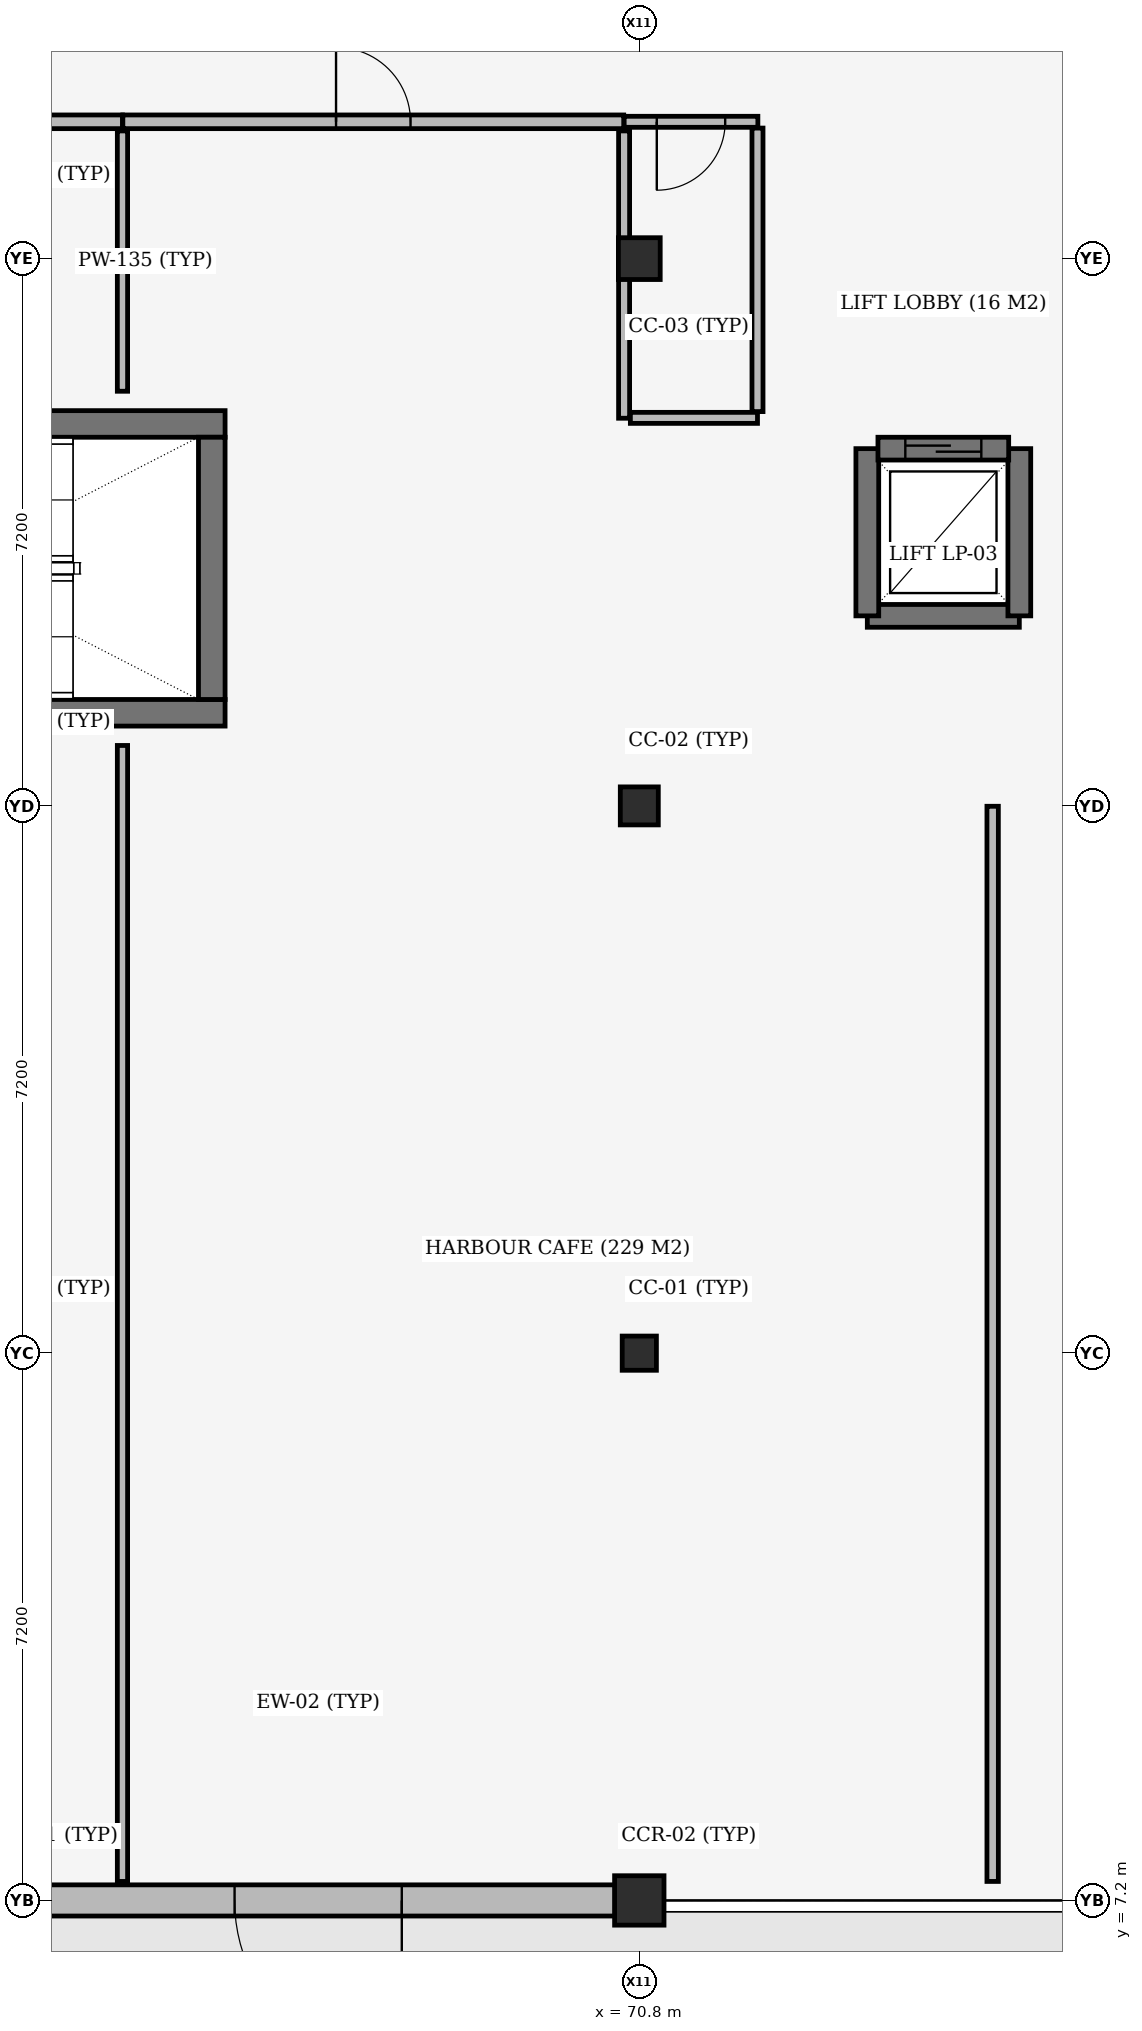
"""IFC4 building model, lengths in metres.
Left out: names, types, materials, properties, quantities, classifications, styles, units other than length and angle.
Written with IfcOpenShell. Run it as: python <this file> out.ifc"""

import sys

from ifc_helpers import new_model, si_unit, direction, frame, frame_2d, origin, origin_2d, place, context, subcontext, project, spatial, rectangle, circle, extrude, element, fill, save


model = new_model("IFC4")
c1 = context("Model", 3, precision=1e-05, world=origin(), true_north=direction((0.0, 1.0)))
c2 = subcontext(c1, "Body", "Model", "MODEL_VIEW")
j1 = project(units=[si_unit("LENGTHUNIT", "METRE"), si_unit("PLANEANGLEUNIT", "RADIAN")], contexts=[c1])
p1 = place(None, origin())
s1 = spatial("IfcSite", under=j1, at=p1, CompositionType="ELEMENT")
p2 = place(p1, origin())
s2 = spatial("IfcBuilding", under=s1, at=p2, CompositionType="ELEMENT")
p3 = place(p2, origin())
s3 = spatial("IfcBuildingStorey", under=s2, at=p3, CompositionType="ELEMENT", Elevation=0.0)
p4 = place(p3, frame((70.8, 7.2, 0.0), z_axis=(0.0, 0.0, 1.0), x_axis=(1.0, 0.0, 0.0)))
e1 = element("IfcColumn", 1, at=p4, inside=s3, PredefinedType="COLUMN", context=c2, shape_type="SweptSolid", body=[
    extrude(circle(Radius=0.325, at=origin_2d()), origin(), (0.0, 0.0, 1.0), 5.1),
])
p5 = place(p3, frame((70.8, 14.4, 0.0), z_axis=(0.0, 0.0, 1.0), x_axis=(1.0, 0.0, 0.0)))
e2 = element("IfcColumn", 2, at=p5, inside=s3, PredefinedType="COLUMN", context=c2, shape_type="SweptSolid", body=[
    extrude(rectangle(XDim=0.45, YDim=0.45, at=origin_2d()), origin(), (0.0, 0.0, 1.0), 5.1),
])
p6 = place(p3, frame((70.8, 21.6, 0.0), z_axis=(0.0, 0.0, 1.0), x_axis=(1.0, 0.0, 0.0)))
e3 = element("IfcColumn", 3, at=p6, inside=s3, PredefinedType="COLUMN", context=c2, shape_type="SweptSolid", body=[
    extrude(rectangle(XDim=0.5, YDim=0.5, at=origin_2d()), origin(), (0.0, 0.0, 1.0), 5.1),
])
p7 = place(p3, frame((70.8, 28.8, 0.0), z_axis=(0.0, 0.0, 1.0), x_axis=(1.0, 0.0, 0.0)))
e4 = element("IfcColumn", 4, at=p7, inside=s3, PredefinedType="COLUMN", context=c2, shape_type="SweptSolid", body=[
    extrude(rectangle(XDim=0.55, YDim=0.55, at=origin_2d()), origin(), (0.0, 0.0, 1.0), 5.1),
])
for number, where, z_axis, x_axis in (
    (5, (56.25, 22.825, 0.0), (0.0, 0.0, 1.0), (1.0, 0.0, 0.0)),
    (6, (65.35, 26.625, 0.0), (0.0, 0.0, 1.0), (-1.0, 0.0, 0.0)),
):
    element("IfcWall", number, at=place(p3, frame(where, z_axis=z_axis, x_axis=x_axis)), inside=s3, PredefinedType="SHEAR", context=c2, shape_type="SweptSolid", body=[
        extrude(rectangle(XDim=9.1, YDim=0.35, at=frame_2d((4.55, 0.0))), origin(), (0.0, 0.0, 1.0), 5.1),
    ])
p8 = place(p3, frame((65.175, 23.0, 0.0), z_axis=(0.0, 0.0, 1.0), x_axis=(0.0, 1.0, 0.0)))
e7 = element("IfcWall", 7, at=p8, inside=s3, PredefinedType="SHEAR", context=c2, shape_type="SweptSolid", body=[
    extrude(rectangle(XDim=3.45, YDim=0.35, at=frame_2d((1.725, 0.0))), origin(), (0.0, 0.0, 1.0), 5.1),
])
p9 = place(p3, frame((73.8, 24.1, 0.0), z_axis=(0.0, 0.0, 1.0), x_axis=(1.0, 0.0, 0.0)))
e8 = element("IfcWall", 8, at=p9, inside=s3, PredefinedType="SHEAR", context=c2, shape_type="SweptSolid", body=[
    extrude(rectangle(XDim=2.0, YDim=0.3, at=frame_2d((1.0, 0.0))), origin(), (0.0, 0.0, 1.0), 5.1),
])
for number, where, z_axis, x_axis in (
    (9, (73.8, 26.3, 0.0), (0.0, 0.0, 1.0), (0.0, -1.0, 0.0)),
    (10, (75.8, 24.1, 0.0), (0.0, 0.0, 1.0), (0.0, 1.0, 0.0)),
):
    element("IfcWall", number, at=place(p3, frame(where, z_axis=z_axis, x_axis=x_axis)), inside=s3, PredefinedType="SHEAR", context=c2, shape_type="SweptSolid", body=[
        extrude(rectangle(XDim=2.2, YDim=0.3, at=frame_2d((1.1, 0.0))), origin(), (0.0, 0.0, 1.0), 5.1),
    ])
p10 = place(p3, frame((70.483, 7.2, 0.0), z_axis=(0.0, 0.0, 1.0), x_axis=(-1.0, 0.0, 0.0)))
e11 = element("IfcWall", 11, at=p10, inside=s3, PredefinedType="STANDARD", context=c2, shape_type="SweptSolid", body=[
    extrude(rectangle(XDim=7.816, YDim=0.41, at=frame_2d((3.908, 0.0))), origin(), (0.0, 0.0, 1.0), 4.4),
])
p11 = place(p10, frame((2.808, 0.0, 0.0)))
e12 = element("IfcOpeningElement", 12, at=p11, cuts=e11, PredefinedType="OPENING", context=c2, shape_type="SweptSolid", body=[
    extrude(rectangle(XDim=2.2, YDim=2.5, at=frame_2d((1.1, 1.25))), frame((0.0, 0.215, 0.0), z_axis=(0.0, -1.0, 0.0), x_axis=(1.0, 0.0, 0.0)), (0.0, 0.0, 1.0), 0.43),
])
p12 = place(p3, frame((73.94, 26.3, 0.0), z_axis=(0.0, 0.0, 1.0), x_axis=(1.0, 0.0, 0.0)))
e13 = element("IfcWall", 13, at=p12, inside=s3, PredefinedType="SHEAR", context=c2, shape_type="SweptSolid", body=[
    extrude(rectangle(XDim=1.72, YDim=0.3, at=frame_2d((0.86, 0.0))), origin(), (0.0, 0.0, 1.0), 5.1),
])
p13 = place(p12, frame((0.36, 0.0, 0.0)))
e14 = element("IfcOpeningElement", 14, at=p13, cuts=e13, PredefinedType="OPENING", context=c2, shape_type="SweptSolid", body=[
    extrude(rectangle(XDim=1.0, YDim=2.1, at=frame_2d((0.5, 1.05))), frame((0.0, 0.16, 0.0), z_axis=(0.0, -1.0, 0.0), x_axis=(1.0, 0.0, 0.0)), (0.0, 0.0, 1.0), 0.32),
])
p14 = place(p3, frame((70.6, 30.6, 0.0), z_axis=(0.0, 0.0, 1.0), x_axis=(1.0, 0.0, 0.0)))
e15 = element("IfcWall", 15, at=p14, inside=s3, PredefinedType="PLUMBINGWALL", context=c2, shape_type="SweptSolid", body=[
    extrude(rectangle(XDim=1.76, YDim=0.145, at=frame_2d((0.88, 0.0))), origin(), (0.0, 0.0, 1.0), 4.5),
])
p15 = place(p14, frame((0.43, 0.0, 0.0)))
e16 = element("IfcOpeningElement", 16, at=p15, cuts=e15, PredefinedType="OPENING", context=c2, shape_type="SweptSolid", body=[
    extrude(rectangle(XDim=0.9, YDim=2.1, at=frame_2d((0.45, 1.05))), frame((0.0, 0.083, 0.0), z_axis=(0.0, -1.0, 0.0), x_axis=(1.0, 0.0, 0.0)), (0.0, 0.0, 1.0), 0.165),
])
p16 = place(p3, frame((70.6, 26.7, 0.0), z_axis=(0.0, 0.0, 1.0), x_axis=(0.0, 1.0, 0.0)))
e17 = element("IfcWall", 17, at=p16, inside=s3, PredefinedType="PLUMBINGWALL", context=c2, shape_type="SweptSolid", body=[
    extrude(rectangle(XDim=3.78, YDim=0.145, at=frame_2d((1.89, 0.0))), origin(), (0.0, 0.0, 1.0), 4.3),
])
p17 = place(p3, frame((57.52, 30.6, 0.0), z_axis=(0.0, 0.0, 1.0), x_axis=(1.0, 0.0, 0.0)))
e18 = element("IfcWall", 18, at=p17, inside=s3, PredefinedType="PARTITIONING", context=c2, shape_type="SweptSolid", body=[
    extrude(rectangle(XDim=6.48, YDim=0.18, at=frame_2d((3.24, 0.0))), origin(), (0.0, 0.0, 1.0), 4.45),
])
p18 = place(p17, frame((2.745, 0.0, 0.0)))
e19 = element("IfcOpeningElement", 19, at=p18, cuts=e18, PredefinedType="OPENING", context=c2, shape_type="SweptSolid", body=[
    extrude(rectangle(XDim=0.99, YDim=2.18, at=frame_2d((0.495, 1.09))), frame((0.0, 0.1, 0.0), z_axis=(0.0, -1.0, 0.0), x_axis=(1.0, 0.0, 0.0)), (0.0, 0.0, 1.0), 0.2),
])
p19 = place(p3, frame((64.0, 27.055, 0.0), z_axis=(0.0, 0.0, 1.0), x_axis=(0.0, 1.0, 0.0)))
e20 = element("IfcWall", 20, at=p19, inside=s3, PredefinedType="PARTITIONING", context=c2, shape_type="SweptSolid", body=[
    extrude(rectangle(XDim=3.425, YDim=0.135, at=frame_2d((1.712, 0.0))), origin(), (0.0, 0.0, 1.0), 4.4),
])
p20 = place(p3, frame((64.005, 30.6, 0.0), z_axis=(0.0, 0.0, 1.0), x_axis=(1.0, 0.0, 0.0)))
e21 = element("IfcWall", 21, at=p20, inside=s3, PredefinedType="PARTITIONING", context=c2, shape_type="SweptSolid", body=[
    extrude(rectangle(XDim=6.59, YDim=0.18, at=frame_2d((3.295, 0.0))), origin(), (0.0, 0.0, 1.0), 4.65),
])
p21 = place(p20, frame((2.805, 0.0, 0.0)))
e22 = element("IfcOpeningElement", 22, at=p21, cuts=e21, PredefinedType="OPENING", context=c2, shape_type="SweptSolid", body=[
    extrude(rectangle(XDim=0.98, YDim=2.18, at=frame_2d((0.49, 1.09))), frame((0.0, 0.1, 0.0), z_axis=(0.0, -1.0, 0.0), x_axis=(1.0, 0.0, 0.0)), (0.0, 0.0, 1.0), 0.2),
])
p22 = place(p3, frame((64.0, 7.45, 0.0), z_axis=(0.0, 0.0, 1.0), x_axis=(0.0, 1.0, 0.0)))
e23 = element("IfcWall", 23, at=p22, inside=s3, PredefinedType="PARTITIONING", context=c2, shape_type="SweptSolid", body=[
    extrude(rectangle(XDim=14.945, YDim=0.135, at=frame_2d((7.473, 0.0))), origin(), (0.0, 0.0, 1.0), 4.3),
])
p23 = place(p3, frame((75.449, 7.45, 0.0), z_axis=(0.0, 0.0, 1.0), x_axis=(0.0, 1.0, 0.0)))
e24 = element("IfcWall", 24, at=p23, inside=s3, PredefinedType="PARTITIONING", context=c2, shape_type="SweptSolid", body=[
    extrude(rectangle(XDim=14.145, YDim=0.15, at=frame_2d((7.073, 0.0))), origin(), (0.0, 0.0, 1.0), 4.45),
])
p24 = place(p3, frame((70.683, 26.705, 0.0), z_axis=(0.0, 0.0, 1.0), x_axis=(1.0, 0.0, 0.0)))
e25 = element("IfcWall", 25, at=p24, inside=s3, PredefinedType="PLUMBINGWALL", context=c2, shape_type="SweptSolid", body=[
    extrude(rectangle(XDim=1.672, YDim=0.145, at=frame_2d((0.836, 0.0))), origin(), (0.0, 0.0, 1.0), 4.3),
])
p25 = place(p3, frame((72.355, 26.788, 0.0), z_axis=(0.0, 0.0, 1.0), x_axis=(0.0, 1.0, 0.0)))
e26 = element("IfcWall", 26, at=p25, inside=s3, PredefinedType="PLUMBINGWALL", context=c2, shape_type="SweptSolid", body=[
    extrude(rectangle(XDim=3.73, YDim=0.145, at=frame_2d((1.865, 0.0))), origin(), (0.0, 0.0, 1.0), 4.35),
])
p26 = place(p11, origin())
e27 = element("IfcDoor", 27, at=p26, inside=s3, OperationType="DOUBLE_DOOR_SINGLE_SWING", PredefinedType="DOOR", context=c2, shape_type="SweptSolid", body=[
    extrude(rectangle(XDim=2.2, YDim=2.5, at=frame_2d((1.1, 1.25))), frame((0.0, 0.025, 0.0), z_axis=(0.0, -1.0, 0.0), x_axis=(1.0, 0.0, 0.0)), (0.0, 0.0, 1.0), 0.05),
])
fill(e12, e27)
p27 = place(p13, origin())
e28 = element("IfcDoor", 28, at=p27, inside=s3, OperationType="SLIDING_TO_LEFT", PredefinedType="DOOR", context=c2, shape_type="SweptSolid", body=[
    extrude(rectangle(XDim=1.0, YDim=2.1, at=frame_2d((0.5, 1.05))), frame((0.0, 0.025, 0.0), z_axis=(0.0, -1.0, 0.0), x_axis=(1.0, 0.0, 0.0)), (0.0, 0.0, 1.0), 0.05),
])
fill(e14, e28)
p28 = place(p15, origin())
e29 = element("IfcDoor", 29, at=p28, inside=s3, OperationType="SINGLE_SWING_RIGHT", PredefinedType="DOOR", context=c2, shape_type="SweptSolid", body=[
    extrude(rectangle(XDim=0.9, YDim=2.1, at=frame_2d((0.45, 1.05))), frame((0.0, 0.025, 0.0), z_axis=(0.0, -1.0, 0.0), x_axis=(1.0, 0.0, 0.0)), (0.0, 0.0, 1.0), 0.05),
])
fill(e16, e29)
p29 = place(p21, origin())
e30 = element("IfcDoor", 30, at=p29, inside=s3, OperationType="SINGLE_SWING_LEFT", PredefinedType="DOOR", context=c2, shape_type="SweptSolid", body=[
    extrude(rectangle(XDim=0.98, YDim=2.18, at=frame_2d((0.49, 1.09))), frame((0.0, 0.025, 0.0), z_axis=(0.0, -1.0, 0.0), x_axis=(1.0, 0.0, 0.0)), (0.0, 0.0, 1.0), 0.05),
])
fill(e22, e30)
save(model, sys.argv[1])
